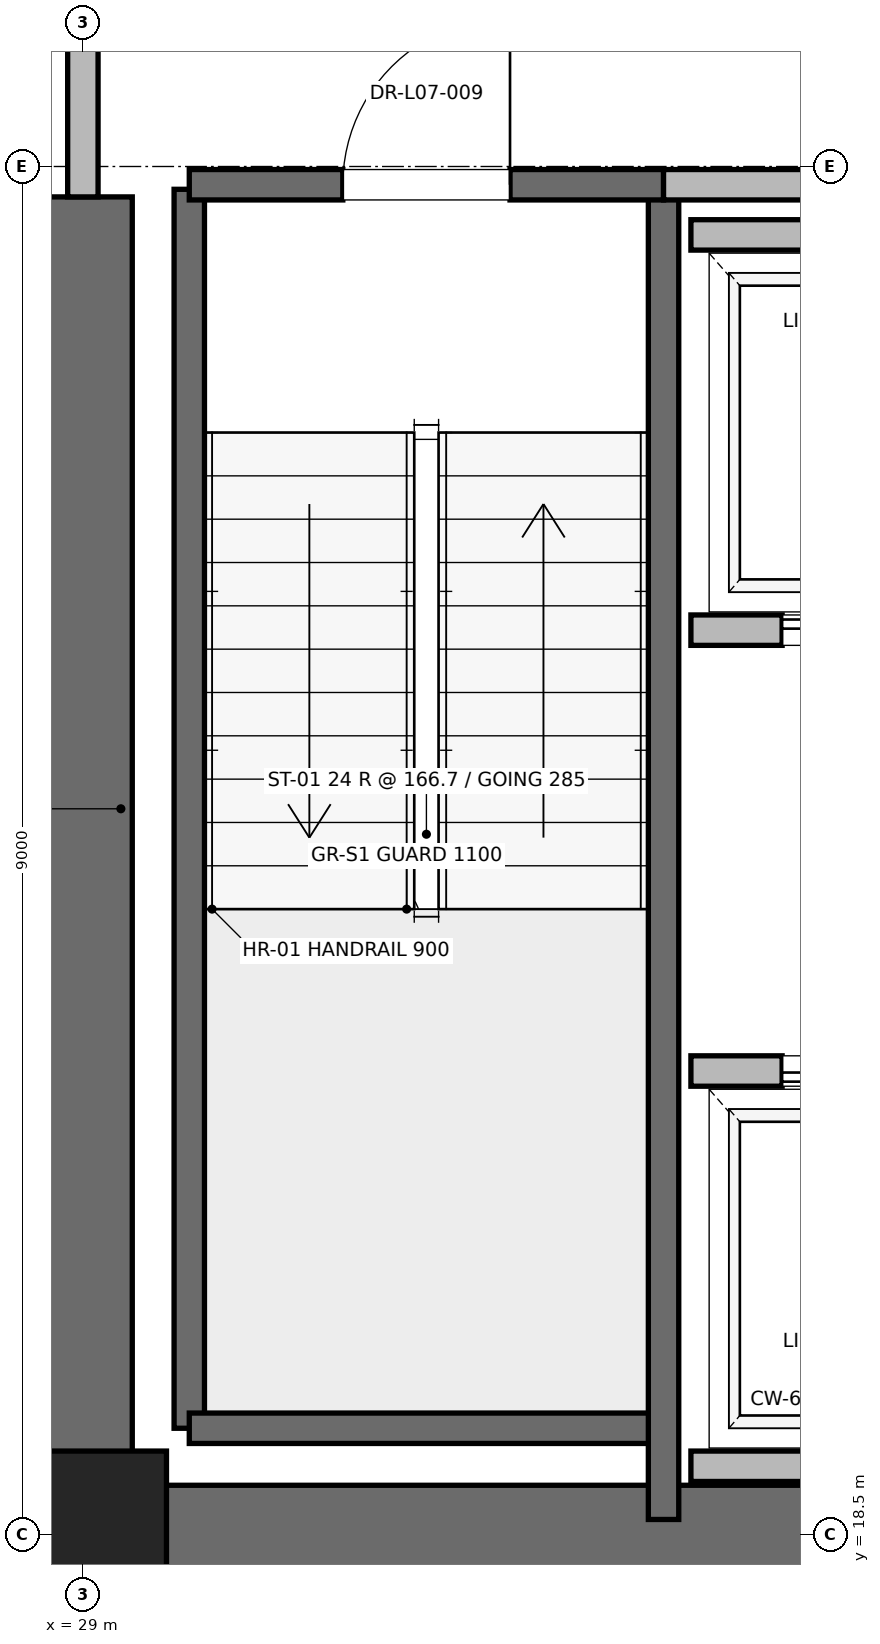
"""IFC4 building model, lengths in metres.
Left out: names, types, materials, properties, quantities, classifications, styles, units other than length and angle.
Written with IfcOpenShell. Run it as: python <this file> out.ifc"""

import sys

from ifc_helpers import new_model, si_unit, direction, frame, frame_2d, origin, origin_2d, place, context, subcontext, project, spatial, rectangle, extrude, element, fill, save


model = new_model("IFC4")
c1 = context("Model", 3, precision=1e-05, world=origin(), true_north=direction((0.0, 1.0)))
c2 = subcontext(c1, "Body", "Model", "MODEL_VIEW")
j1 = project(units=[si_unit("LENGTHUNIT", "METRE"), si_unit("PLANEANGLEUNIT", "RADIAN")], contexts=[c1])
p1 = place(None, origin())
s1 = spatial("IfcSite", under=j1, at=p1, CompositionType="ELEMENT")
p2 = place(p1, origin())
s2 = spatial("IfcBuilding", under=s1, at=p2, CompositionType="ELEMENT")
p3 = place(p2, frame((0.0, 0.0, 35.6)))
s3 = spatial("IfcBuildingStorey", under=s2, at=p3, CompositionType="ELEMENT", Elevation=35.6)
p4 = place(p3, frame((29.0, 18.5, 0.0), z_axis=(0.0, 0.0, 1.0), x_axis=(1.0, 0.0, 0.0)))
e1 = element("IfcColumn", 1, at=p4, inside=s3, PredefinedType="PILASTER", context=c2, shape_type="SweptSolid", body=[
    extrude(rectangle(XDim=1.1, YDim=1.1, at=origin_2d()), origin(), (0.0, 0.0, 1.0), 4.0),
])
p5 = place(p3, frame((29.0, 18.5, 0.0), z_axis=(0.0, 0.0, 1.0), x_axis=(1.0, 0.0, 0.0)))
e2 = element("IfcWall", 2, at=p5, inside=s3, PredefinedType="SHEAR", context=c2, shape_type="SweptSolid", body=[
    extrude(rectangle(XDim=9.2, YDim=0.65, at=frame_2d((4.6, 0.0))), origin(), (0.0, 0.0, 1.0), 3.76),
])
p6 = place(p3, frame((29.0, 18.5, 0.0), z_axis=(0.0, 0.0, 1.0), x_axis=(0.0, 1.0, 0.0)))
e3 = element("IfcWall", 3, at=p6, inside=s3, PredefinedType="SHEAR", context=c2, shape_type="SweptSolid", body=[
    extrude(rectangle(XDim=8.8, YDim=0.65, at=frame_2d((4.4, 0.0))), origin(), (0.0, 0.0, 1.0), 3.76),
])
p7 = place(p3, frame((29.7, 19.2, 0.0), z_axis=(0.0, 0.0, 1.0), x_axis=(0.0, 1.0, 0.0)))
e4 = element("IfcWall", 4, at=p7, inside=s3, PredefinedType="SOLIDWALL", context=c2, shape_type="SweptSolid", body=[
    extrude(rectangle(XDim=8.15, YDim=0.2, at=frame_2d((4.075, 0.0))), origin(), (0.0, 0.0, 1.0), 3.76),
])
p8 = place(p3, frame((29.7, 19.2, 0.0), z_axis=(0.0, 0.0, 1.0), x_axis=(1.0, 0.0, 0.0)))
e5 = element("IfcWall", 5, at=p8, inside=s3, PredefinedType="SOLIDWALL", context=c2, shape_type="SweptSolid", body=[
    extrude(rectangle(XDim=3.12, YDim=0.2, at=frame_2d((1.56, 0.0))), origin(), (0.0, 0.0, 1.0), 3.76),
])
p9 = place(p3, frame((32.82, 18.6, 0.0), z_axis=(0.0, 0.0, 1.0), x_axis=(0.0, 1.0, 0.0)))
e6 = element("IfcWall", 6, at=p9, inside=s3, PredefinedType="SOLIDWALL", context=c2, shape_type="SweptSolid", body=[
    extrude(rectangle(XDim=8.78, YDim=0.2, at=frame_2d((4.39, 0.0))), origin(), (0.0, 0.0, 1.0), 3.76),
])
p10 = place(p3, frame((29.7, 27.38, 0.0), z_axis=(0.0, 0.0, 1.0), x_axis=(1.0, 0.0, 0.0)))
e7 = element("IfcWall", 7, at=p10, inside=s3, PredefinedType="SOLIDWALL", context=c2, shape_type="SweptSolid", body=[
    extrude(rectangle(XDim=3.12, YDim=0.2, at=frame_2d((1.56, 0.0))), origin(), (0.0, 0.0, 1.0), 3.76),
])
p11 = place(p10, frame((1.01, 0.0, 0.0)))
e8 = element("IfcOpeningElement", 8, at=p11, cuts=e7, PredefinedType="OPENING", context=c2, shape_type="SweptSolid", body=[
    extrude(rectangle(XDim=1.1, YDim=2.15, at=frame_2d((0.55, 1.075))), frame((0.0, 0.1, 0.0), z_axis=(0.0, -1.0, 0.0), x_axis=(1.0, 0.0, 0.0)), (0.0, 0.0, 1.0), 0.2),
])
p12 = place(p3, frame((29.0, 27.3, 0.0), z_axis=(0.0, 0.0, 1.0), x_axis=(0.0, 1.0, 0.0)))
e9 = element("IfcWall", 9, at=p12, inside=s3, PredefinedType="PARTITIONING", context=c2, shape_type="SweptSolid", body=[
    extrude(rectangle(XDim=3.4, YDim=0.2, at=frame_2d((1.7, 0.0))), origin(), (0.0, 0.0, 1.0), 2.54),
])
p13 = place(p12, frame((1.125, 0.0, 0.0)))
e10 = element("IfcOpeningElement", 10, at=p13, cuts=e9, PredefinedType="OPENING", context=c2, shape_type="SweptSolid", body=[
    extrude(rectangle(XDim=1.15, YDim=2.2, at=frame_2d((0.575, 1.1))), frame((0.0, 0.1, 0.0), z_axis=(0.0, -1.0, 0.0), x_axis=(1.0, 0.0, 0.0)), (0.0, 0.0, 1.0), 0.2),
])
p14 = place(p3, frame((32.82, 27.38, 0.0), z_axis=(0.0, 0.0, 1.0), x_axis=(1.0, 0.0, 0.0)))
e11 = element("IfcWall", 11, at=p14, inside=s3, PredefinedType="PARTITIONING", context=c2, shape_type="SweptSolid", body=[
    extrude(rectangle(XDim=5.62, YDim=0.2, at=frame_2d((2.81, 0.0))), origin(), (0.0, 0.0, 1.0), 3.76),
])
p15 = place(p3, frame((33.0, 18.95, 0.0), z_axis=(0.0, 0.0, 1.0), x_axis=(1.0, 0.0, 0.0)))
e12 = element("IfcWall", 12, at=p15, inside=s3, PredefinedType="SOLIDWALL", context=c2, shape_type="SweptSolid", body=[
    extrude(rectangle(XDim=2.3, YDim=0.2, at=frame_2d((1.15, 0.0))), origin(), (0.0, 0.0, 1.0), 3.76),
])
p16 = place(p3, frame((35.3, 21.55, 0.0), z_axis=(0.0, 0.0, 1.0), x_axis=(-1.0, 0.0, 0.0)))
e13 = element("IfcWall", 13, at=p16, inside=s3, PredefinedType="SOLIDWALL", context=c2, shape_type="SweptSolid", body=[
    extrude(rectangle(XDim=2.3, YDim=0.2, at=frame_2d((1.15, 0.0))), origin(), (0.0, 0.0, 1.0), 3.76),
])
p17 = place(p16, frame((0.6, 0.0, 0.0)))
e14 = element("IfcOpeningElement", 14, at=p17, cuts=e13, PredefinedType="OPENING", context=c2, shape_type="SweptSolid", body=[
    extrude(rectangle(XDim=1.1, YDim=2.2, at=frame_2d((0.55, 1.1))), frame((0.0, 0.1, 0.0), z_axis=(0.0, -1.0, 0.0), x_axis=(1.0, 0.0, 0.0)), (0.0, 0.0, 1.0), 0.2),
])
p18 = place(p3, frame((33.0, 24.45, 0.0), z_axis=(0.0, 0.0, 1.0), x_axis=(1.0, 0.0, 0.0)))
e15 = element("IfcWall", 15, at=p18, inside=s3, PredefinedType="SOLIDWALL", context=c2, shape_type="SweptSolid", body=[
    extrude(rectangle(XDim=2.3, YDim=0.2, at=frame_2d((1.15, 0.0))), origin(), (0.0, 0.0, 1.0), 3.76),
])
p19 = place(p18, frame((0.6, 0.0, 0.0)))
e16 = element("IfcOpeningElement", 16, at=p19, cuts=e15, PredefinedType="OPENING", context=c2, shape_type="SweptSolid", body=[
    extrude(rectangle(XDim=1.1, YDim=2.2, at=frame_2d((0.55, 1.1))), frame((0.0, 0.1, 0.0), z_axis=(0.0, -1.0, 0.0), x_axis=(1.0, 0.0, 0.0)), (0.0, 0.0, 1.0), 0.2),
])
p20 = place(p3, frame((35.3, 27.05, 0.0), z_axis=(0.0, 0.0, 1.0), x_axis=(-1.0, 0.0, 0.0)))
e17 = element("IfcWall", 17, at=p20, inside=s3, PredefinedType="SOLIDWALL", context=c2, shape_type="SweptSolid", body=[
    extrude(rectangle(XDim=2.3, YDim=0.2, at=frame_2d((1.15, 0.0))), origin(), (0.0, 0.0, 1.0), 3.76),
])
p21 = place(p11, origin())
e18 = element("IfcDoor", 18, at=p21, inside=s3, OperationType="SINGLE_SWING_RIGHT", PredefinedType="DOOR", context=c2, shape_type="SweptSolid", body=[
    extrude(rectangle(XDim=1.1, YDim=2.15, at=frame_2d((0.55, 1.075))), frame((0.0, 0.025, 0.0), z_axis=(0.0, -1.0, 0.0), x_axis=(1.0, 0.0, 0.0)), (0.0, 0.0, 1.0), 0.05),
])
fill(e8, e18)
p22 = place(p17, origin())
e19 = element("IfcDoor", 19, at=p22, inside=s3, OperationType="SLIDING_TO_RIGHT", PredefinedType="DOOR", context=c2, shape_type="SweptSolid", body=[
    extrude(rectangle(XDim=1.1, YDim=2.2, at=frame_2d((0.55, 1.1))), frame((0.0, 0.025, 0.0), z_axis=(0.0, -1.0, 0.0), x_axis=(1.0, 0.0, 0.0)), (0.0, 0.0, 1.0), 0.05),
])
fill(e14, e19)
p23 = place(p19, origin())
e20 = element("IfcDoor", 20, at=p23, inside=s3, OperationType="SLIDING_TO_RIGHT", PredefinedType="DOOR", context=c2, shape_type="SweptSolid", body=[
    extrude(rectangle(XDim=1.1, YDim=2.2, at=frame_2d((0.55, 1.1))), frame((0.0, 0.025, 0.0), z_axis=(0.0, -1.0, 0.0), x_axis=(1.0, 0.0, 0.0)), (0.0, 0.0, 1.0), 0.05),
])
fill(e16, e20)
save(model, sys.argv[1])
